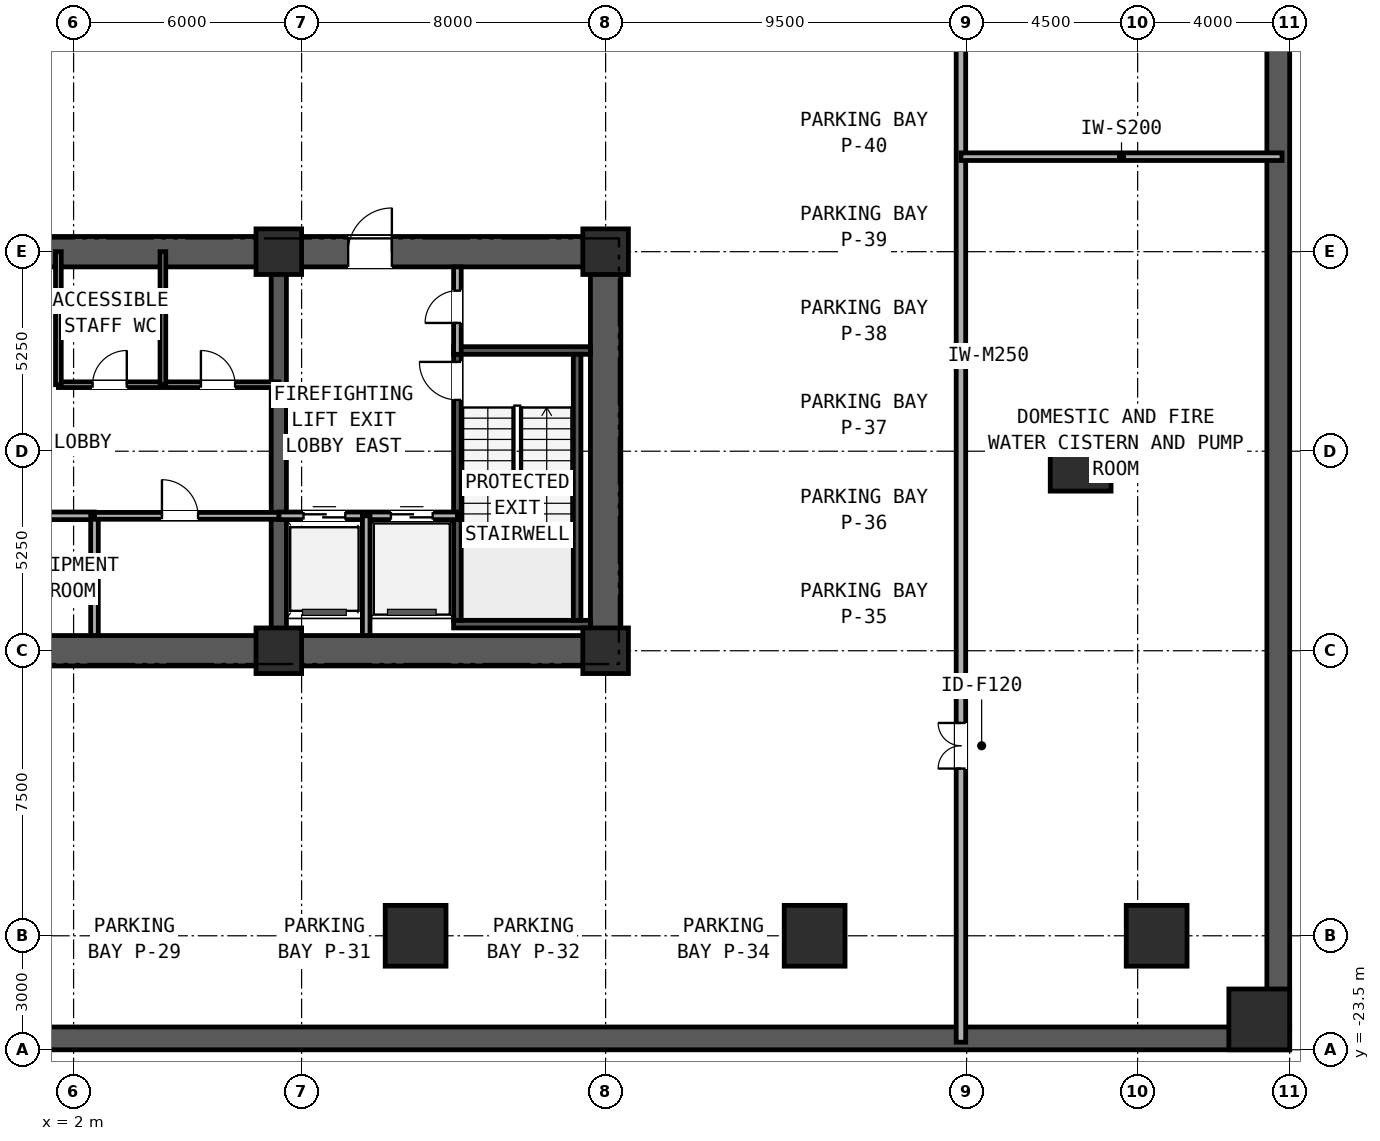
"""IFC4 building model, lengths in metres.
Left out: names, types, materials, properties, quantities, classifications, styles, units other than length and angle.
Written with IfcOpenShell. Run it as: python <this file> out.ifc"""

import sys

from ifc_helpers import new_model, si_unit, direction, frame, frame_2d, origin, origin_2d, place, context, subcontext, project, spatial, rectangle, extrude, element, fill, save


model = new_model("IFC4")
c1 = context("Model", 3, precision=1e-05, world=origin(), true_north=direction((0.0, 1.0)))
c2 = subcontext(c1, "Body", "Model", "MODEL_VIEW")
j1 = project(units=[si_unit("LENGTHUNIT", "METRE"), si_unit("PLANEANGLEUNIT", "RADIAN")], contexts=[c1])
p1 = place(None, origin())
s1 = spatial("IfcSite", under=j1, at=p1, CompositionType="ELEMENT")
p2 = place(p1, origin())
s2 = spatial("IfcBuilding", under=s1, at=p2, CompositionType="ELEMENT")
p3 = place(p2, frame((0.0, 0.0, -10.0)))
s3 = spatial("IfcBuildingStorey", under=s2, at=p3, CompositionType="ELEMENT", Elevation=-10.0)
p4 = place(p3, frame((-16.4, -13.0, 0.0), z_axis=(0.0, 0.0, 1.0), x_axis=(1.0, 0.0, 0.0)))
e1 = element("IfcWall", 1, at=p4, inside=s3, PredefinedType="SHEAR", context=c2, shape_type="SweptSolid", body=[
    extrude(rectangle(XDim=32.8, YDim=0.8, at=frame_2d((16.4, 0.0))), origin(), (0.0, 0.0, 1.0), 4.2),
])
p5 = place(p3, frame((-16.4, -2.5, 0.0), z_axis=(0.0, 0.0, 1.0), x_axis=(1.0, 0.0, 0.0)))
e2 = element("IfcWall", 2, at=p5, inside=s3, PredefinedType="SHEAR", context=c2, shape_type="SweptSolid", body=[
    extrude(rectangle(XDim=32.8, YDim=0.8, at=frame_2d((16.4, 0.0))), origin(), (0.0, 0.0, 1.0), 4.2),
])
p6 = place(p5, frame((6.025, 0.0, 0.0)))
e3 = element("IfcOpeningElement", 3, at=p6, cuts=e2, PredefinedType="OPENING", context=c2, shape_type="SweptSolid", body=[
    extrude(rectangle(XDim=1.15, YDim=2.0, at=frame_2d((0.575, 1.0))), frame((0.0, 0.41, 0.0), z_axis=(0.0, -1.0, 0.0), x_axis=(1.0, 0.0, 0.0)), (0.0, 0.0, 1.0), 0.82),
])
p7 = place(p5, frame((15.6, 0.0, 0.0)))
e4 = element("IfcOpeningElement", 4, at=p7, cuts=e2, PredefinedType="OPENING", context=c2, shape_type="SweptSolid", body=[
    extrude(rectangle(XDim=1.6, YDim=2.0, at=frame_2d((0.8, 1.0))), frame((0.0, 0.41, 0.0), z_axis=(0.0, -1.0, 0.0), x_axis=(1.0, 0.0, 0.0)), (0.0, 0.0, 1.0), 0.82),
])
p8 = place(p5, frame((25.625, 0.0, 0.0)))
e5 = element("IfcOpeningElement", 5, at=p8, cuts=e2, PredefinedType="OPENING", context=c2, shape_type="SweptSolid", body=[
    extrude(rectangle(XDim=1.15, YDim=2.0, at=frame_2d((0.575, 1.0))), frame((0.0, 0.41, 0.0), z_axis=(0.0, -1.0, 0.0), x_axis=(1.0, 0.0, 0.0)), (0.0, 0.0, 1.0), 0.82),
])
p9 = place(p3, frame((16.0, -12.6, 0.0), z_axis=(0.0, 0.0, 1.0), x_axis=(0.0, 1.0, 0.0)))
e6 = element("IfcWall", 6, at=p9, inside=s3, PredefinedType="SHEAR", context=c2, shape_type="SweptSolid", body=[
    extrude(rectangle(XDim=9.7, YDim=0.8, at=frame_2d((4.85, 0.0))), origin(), (0.0, 0.0, 1.0), 4.2),
])
p10 = place(p3, frame((7.4, -12.6, 0.0), z_axis=(0.0, 0.0, 1.0), x_axis=(0.0, 1.0, 0.0)))
e7 = element("IfcWall", 7, at=p10, inside=s3, PredefinedType="SHEAR", context=c2, shape_type="SweptSolid", body=[
    extrude(rectangle(XDim=9.7, YDim=0.4, at=frame_2d((4.85, 0.0))), origin(), (0.0, 0.0, 1.0), 4.48),
])
for number, where, z_axis, x_axis in (
    (8, (12.0, -12.3, 0.0), (0.0, 0.0, 1.0), (1.0, 0.0, 0.0)),
    (9, (12.0, -5.1, 0.0), (0.0, 0.0, 1.0), (1.0, 0.0, 0.0)),
):
    element("IfcWall", number, at=place(p3, frame(where, z_axis=z_axis, x_axis=x_axis)), inside=s3, PredefinedType="SOLIDWALL", context=c2, shape_type="SweptSolid", body=[
        extrude(rectangle(XDim=3.6, YDim=0.2, at=frame_2d((1.8, 0.0))), origin(), (0.0, 0.0, 1.0), 4.48),
    ])
p11 = place(p3, frame((12.1, -12.2, 0.0), z_axis=(0.0, 0.0, 1.0), x_axis=(0.0, 1.0, 0.0)))
e10 = element("IfcWall", 10, at=p11, inside=s3, PredefinedType="SOLIDWALL", context=c2, shape_type="SweptSolid", body=[
    extrude(rectangle(XDim=7.0, YDim=0.2, at=frame_2d((3.5, 0.0))), origin(), (0.0, 0.0, 1.0), 4.48),
])
p12 = place(p11, frame((5.8, 0.0, 0.0)))
e11 = element("IfcOpeningElement", 11, at=p12, cuts=e10, PredefinedType="OPENING", context=c2, shape_type="SweptSolid", body=[
    extrude(rectangle(XDim=1.0, YDim=2.1, at=frame_2d((0.5, 1.05))), frame((0.0, 0.11, 0.0), z_axis=(0.0, -1.0, 0.0), x_axis=(1.0, 0.0, 0.0)), (0.0, 0.0, 1.0), 0.22),
])
p13 = place(p3, frame((15.25, -12.2, 0.0), z_axis=(0.0, 0.0, 1.0), x_axis=(0.0, 1.0, 0.0)))
e12 = element("IfcWall", 12, at=p13, inside=s3, PredefinedType="SOLIDWALL", context=c2, shape_type="SweptSolid", body=[
    extrude(rectangle(XDim=7.0, YDim=0.2, at=frame_2d((3.5, 0.0))), origin(), (0.0, 0.0, 1.0), 4.48),
])
p14 = place(p3, frame((-34.0, -23.2, 0.0), z_axis=(0.0, 0.0, 1.0), x_axis=(1.0, 0.0, 0.0)))
e13 = element("IfcWall", 13, at=p14, inside=s3, PredefinedType="SOLIDWALL", context=c2, shape_type="SweptSolid", body=[
    extrude(rectangle(XDim=68.0, YDim=0.6, at=frame_2d((34.0, 0.0))), origin(), (0.0, 0.0, 1.0), 4.48),
])
p15 = place(p3, frame((33.7, -22.9, 0.0), z_axis=(0.0, 0.0, 1.0), x_axis=(0.0, 1.0, 0.0)))
e14 = element("IfcWall", 14, at=p15, inside=s3, PredefinedType="SOLIDWALL", context=c2, shape_type="SweptSolid", body=[
    extrude(rectangle(XDim=45.8, YDim=0.6, at=frame_2d((22.9, 0.0))), origin(), (0.0, 0.0, 1.0), 4.48),
])
for number, where, z_axis, x_axis in (
    (15, (7.4, -13.0, 0.0), (0.0, 0.0, 1.0), (1.0, 0.0, 0.0)),
    (16, (16.0, -13.0, 0.0), (0.0, 0.0, 1.0), (1.0, 0.0, 0.0)),
    (17, (7.4, -2.5, 0.0), (0.0, 0.0, 1.0), (1.0, 0.0, 0.0)),
    (18, (16.0, -2.5, 0.0), (0.0, 0.0, 1.0), (1.0, 0.0, 0.0)),
):
    element("IfcColumn", number, at=place(p3, frame(where, z_axis=z_axis, x_axis=x_axis)), inside=s3, PredefinedType="COLUMN", context=c2, shape_type="SweptSolid", body=[
        extrude(rectangle(XDim=1.2, YDim=1.2, at=origin_2d()), origin(), (0.0, 0.0, 1.0), 4.8),
    ])
for number, where, z_axis, x_axis in (
    (19, (33.2, -22.7, 0.0), (0.0, 0.0, 1.0), (1.0, 0.0, 0.0)),
    (20, (11.0, -20.5, 0.0), (0.0, 0.0, 1.0), (1.0, 0.0, 0.0)),
    (21, (21.5, -20.5, 0.0), (0.0, 0.0, 1.0), (1.0, 0.0, 0.0)),
    (22, (30.5, -20.5, 0.0), (0.0, 0.0, 1.0), (1.0, 0.0, 0.0)),
    (23, (28.5, -8.0, 0.0), (0.0, 0.0, 1.0), (1.0, 0.0, 0.0)),
):
    element("IfcColumn", number, at=place(p3, frame(where, z_axis=z_axis, x_axis=x_axis)), inside=s3, PredefinedType="COLUMN", context=c2, shape_type="SweptSolid", body=[
        extrude(rectangle(XDim=1.6, YDim=1.6, at=origin_2d()), origin(), (0.0, 0.0, 1.0), 4.8),
    ])
p16 = place(p3, frame((12.1, -5.2, 0.0), z_axis=(0.0, 0.0, 1.0), x_axis=(0.0, 1.0, 0.0)))
e24 = element("IfcWall", 24, at=p16, inside=s3, PredefinedType="PARTITIONING", context=c2, shape_type="SweptSolid", body=[
    extrude(rectangle(XDim=2.3, YDim=0.2, at=frame_2d((1.15, 0.0))), origin(), (0.0, 0.0, 1.0), 4.48),
])
p17 = place(p16, frame((0.825, 0.0, 0.0)))
e25 = element("IfcOpeningElement", 25, at=p17, cuts=e24, PredefinedType="OPENING", context=c2, shape_type="SweptSolid", body=[
    extrude(rectangle(XDim=0.85, YDim=2.05, at=frame_2d((0.425, 1.025))), frame((0.0, 0.11, 0.0), z_axis=(0.0, -1.0, 0.0), x_axis=(1.0, 0.0, 0.0)), (0.0, 0.0, 1.0), 0.22),
])
p18 = place(p3, frame((7.4, -9.45, 0.0), z_axis=(0.0, 0.0, 1.0), x_axis=(1.0, 0.0, 0.0)))
e26 = element("IfcWall", 26, at=p18, inside=s3, PredefinedType="PARTITIONING", context=c2, shape_type="SweptSolid", body=[
    extrude(rectangle(XDim=4.7, YDim=0.2, at=frame_2d((2.35, 0.0))), origin(), (0.0, 0.0, 1.0), 4.48),
])
p19 = place(p18, frame((2.95, 0.0, 0.0)))
e27 = element("IfcOpeningElement", 27, at=p19, cuts=e26, PredefinedType="OPENING", context=c2, shape_type="SweptSolid", body=[
    extrude(rectangle(XDim=1.1, YDim=2.2, at=frame_2d((0.55, 1.1))), frame((0.0, 0.11, 0.0), z_axis=(0.0, -1.0, 0.0), x_axis=(1.0, 0.0, 0.0)), (0.0, 0.0, 1.0), 0.22),
])
p20 = place(p18, frame((0.65, 0.0, 0.0)))
e28 = element("IfcOpeningElement", 28, at=p20, cuts=e26, PredefinedType="OPENING", context=c2, shape_type="SweptSolid", body=[
    extrude(rectangle(XDim=1.1, YDim=2.2, at=frame_2d((0.55, 1.1))), frame((0.0, 0.11, 0.0), z_axis=(0.0, -1.0, 0.0), x_axis=(1.0, 0.0, 0.0)), (0.0, 0.0, 1.0), 0.22),
])
p21 = place(p3, frame((9.7, -12.6, 0.0), z_axis=(0.0, 0.0, 1.0), x_axis=(0.0, 1.0, 0.0)))
e29 = element("IfcWall", 29, at=p21, inside=s3, PredefinedType="PARTITIONING", context=c2, shape_type="SweptSolid", body=[
    extrude(rectangle(XDim=3.15, YDim=0.2, at=frame_2d((1.575, 0.0))), origin(), (0.0, 0.0, 1.0), 4.48),
])
p22 = place(p3, frame((-2.55, -9.45, 0.0), z_axis=(0.0, 0.0, 1.0), x_axis=(1.0, 0.0, 0.0)))
e30 = element("IfcWall", 30, at=p22, inside=s3, PredefinedType="PARTITIONING", context=c2, shape_type="SweptSolid", body=[
    extrude(rectangle(XDim=5.1, YDim=0.2, at=frame_2d((2.55, 0.0))), origin(), (0.0, 0.0, 1.0), 4.48),
])
p23 = place(p22, frame((2.075, 0.0, 0.0)))
e31 = element("IfcOpeningElement", 31, at=p23, cuts=e30, PredefinedType="OPENING", context=c2, shape_type="SweptSolid", body=[
    extrude(rectangle(XDim=0.95, YDim=2.15, at=frame_2d((0.475, 1.075))), frame((0.0, 0.11, 0.0), z_axis=(0.0, -1.0, 0.0), x_axis=(1.0, 0.0, 0.0)), (0.0, 0.0, 1.0), 0.22),
])
p24 = place(p3, frame((2.55, -12.6, 0.0), z_axis=(0.0, 0.0, 1.0), x_axis=(0.0, 1.0, 0.0)))
e32 = element("IfcWall", 32, at=p24, inside=s3, PredefinedType="PARTITIONING", context=c2, shape_type="SweptSolid", body=[
    extrude(rectangle(XDim=3.15, YDim=0.2, at=frame_2d((1.575, 0.0))), origin(), (0.0, 0.0, 1.0), 4.48),
])
p25 = place(p3, frame((2.55, -9.45, 0.0), z_axis=(0.0, 0.0, 1.0), x_axis=(1.0, 0.0, 0.0)))
e33 = element("IfcWall", 33, at=p25, inside=s3, PredefinedType="PARTITIONING", context=c2, shape_type="SweptSolid", body=[
    extrude(rectangle(XDim=4.85, YDim=0.18, at=frame_2d((2.425, 0.0))), origin(), (0.0, 0.0, 1.0), 4.48),
])
p26 = place(p25, frame((1.775, 0.0, 0.0)))
e34 = element("IfcOpeningElement", 34, at=p26, cuts=e33, PredefinedType="OPENING", context=c2, shape_type="SweptSolid", body=[
    extrude(rectangle(XDim=0.95, YDim=2.15, at=frame_2d((0.475, 1.075))), frame((0.0, 0.1, 0.0), z_axis=(0.0, -1.0, 0.0), x_axis=(1.0, 0.0, 0.0)), (0.0, 0.0, 1.0), 0.2),
])
p27 = place(p3, frame((1.6, -6.0, 0.0), z_axis=(0.0, 0.0, 1.0), x_axis=(1.0, 0.0, 0.0)))
e35 = element("IfcWall", 35, at=p27, inside=s3, PredefinedType="PARTITIONING", context=c2, shape_type="SweptSolid", body=[
    extrude(rectangle(XDim=5.8, YDim=0.15, at=frame_2d((2.9, 0.0))), origin(), (0.0, 0.0, 1.0), 4.48),
])
p28 = place(p27, frame((0.9, 0.0, 0.0)))
e36 = element("IfcOpeningElement", 36, at=p28, cuts=e35, PredefinedType="OPENING", context=c2, shape_type="SweptSolid", body=[
    extrude(rectangle(XDim=0.9, YDim=2.1, at=frame_2d((0.45, 1.05))), frame((0.0, 0.085, 0.0), z_axis=(0.0, -1.0, 0.0), x_axis=(1.0, 0.0, 0.0)), (0.0, 0.0, 1.0), 0.17),
])
p29 = place(p27, frame((3.75, 0.0, 0.0)))
e37 = element("IfcOpeningElement", 37, at=p29, cuts=e35, PredefinedType="OPENING", context=c2, shape_type="SweptSolid", body=[
    extrude(rectangle(XDim=0.9, YDim=2.1, at=frame_2d((0.45, 1.05))), frame((0.0, 0.085, 0.0), z_axis=(0.0, -1.0, 0.0), x_axis=(1.0, 0.0, 0.0)), (0.0, 0.0, 1.0), 0.17),
])
for number, where, z_axis, x_axis in (
    (38, (1.6, -6.0, 0.0), (0.0, 0.0, 1.0), (0.0, 1.0, 0.0)),
    (39, (4.35, -6.0, 0.0), (0.0, 0.0, 1.0), (0.0, 1.0, 0.0)),
):
    element("IfcWall", number, at=place(p3, frame(where, z_axis=z_axis, x_axis=x_axis)), inside=s3, PredefinedType="PARTITIONING", context=c2, shape_type="SweptSolid", body=[
        extrude(rectangle(XDim=3.5, YDim=0.15, at=frame_2d((1.75, 0.0))), origin(), (0.0, 0.0, 1.0), 3.61),
    ])
p30 = place(p3, frame((25.35, -23.3, 0.0), z_axis=(0.0, 0.0, 1.0), x_axis=(0.0, 1.0, 0.0)))
e40 = element("IfcWall", 40, at=p30, inside=s3, PredefinedType="PARTITIONING", context=c2, shape_type="SweptSolid", body=[
    extrude(rectangle(XDim=46.6, YDim=0.25, at=frame_2d((23.3, 0.0))), origin(), (0.0, 0.0, 1.0), 3.522),
])
p31 = place(p30, frame((7.2, 0.0, 0.0)))
e41 = element("IfcOpeningElement", 41, at=p31, cuts=e40, PredefinedType="OPENING", context=c2, shape_type="SweptSolid", body=[
    extrude(rectangle(XDim=1.2, YDim=2.2, at=frame_2d((0.6, 1.1))), frame((0.0, 0.135, 0.0), z_axis=(0.0, -1.0, 0.0), x_axis=(1.0, 0.0, 0.0)), (0.0, 0.0, 1.0), 0.27),
])
p32 = place(p30, frame((27.7, 0.0, 0.0)))
e42 = element("IfcOpeningElement", 42, at=p32, cuts=e40, PredefinedType="OPENING", context=c2, shape_type="SweptSolid", body=[
    extrude(rectangle(XDim=1.2, YDim=2.2, at=frame_2d((0.6, 1.1))), frame((0.0, 0.135, 0.0), z_axis=(0.0, -1.0, 0.0), x_axis=(1.0, 0.0, 0.0)), (0.0, 0.0, 1.0), 0.27),
])
p33 = place(p3, frame((25.35, 0.0, 0.0), z_axis=(0.0, 0.0, 1.0), x_axis=(1.0, 0.0, 0.0)))
e43 = element("IfcWall", 43, at=p33, inside=s3, PredefinedType="PARTITIONING", context=c2, shape_type="SweptSolid", body=[
    extrude(rectangle(XDim=8.45, YDim=0.2, at=frame_2d((4.225, 0.0))), origin(), (0.0, 0.0, 1.0), 3.61),
])
p34 = place(p12, origin())
e44 = element("IfcDoor", 44, at=p34, inside=s3, OperationType="SINGLE_SWING_RIGHT", PredefinedType="DOOR", context=c2, shape_type="SweptSolid", body=[
    extrude(rectangle(XDim=1.0, YDim=2.1, at=frame_2d((0.5, 1.05))), frame((0.0, 0.025, 0.0), z_axis=(0.0, -1.0, 0.0), x_axis=(1.0, 0.0, 0.0)), (0.0, 0.0, 1.0), 0.05),
])
fill(e11, e44)
p35 = place(p17, frame((0.85, 0.0, 0.0), z_axis=(0.0, 0.0, 1.0), x_axis=(-1.0, 0.0, 0.0)))
e45 = element("IfcDoor", 45, at=p35, inside=s3, OperationType="SINGLE_SWING_LEFT", PredefinedType="DOOR", context=c2, shape_type="SweptSolid", body=[
    extrude(rectangle(XDim=0.85, YDim=2.05, at=frame_2d((0.425, 1.025))), frame((0.0, 0.025, 0.0), z_axis=(0.0, -1.0, 0.0), x_axis=(1.0, 0.0, 0.0)), (0.0, 0.0, 1.0), 0.05),
])
fill(e25, e45)
p36 = place(p19, origin())
e46 = element("IfcDoor", 46, at=p36, inside=s3, OperationType="SLIDING_TO_LEFT", PredefinedType="DOOR", context=c2, shape_type="SweptSolid", body=[
    extrude(rectangle(XDim=1.1, YDim=2.2, at=frame_2d((0.55, 1.1))), frame((0.0, 0.025, 0.0), z_axis=(0.0, -1.0, 0.0), x_axis=(1.0, 0.0, 0.0)), (0.0, 0.0, 1.0), 0.05),
])
fill(e27, e46)
p37 = place(p20, origin())
e47 = element("IfcDoor", 47, at=p37, inside=s3, OperationType="SLIDING_TO_RIGHT", PredefinedType="DOOR", context=c2, shape_type="SweptSolid", body=[
    extrude(rectangle(XDim=1.1, YDim=2.2, at=frame_2d((0.55, 1.1))), frame((0.0, 0.025, 0.0), z_axis=(0.0, -1.0, 0.0), x_axis=(1.0, 0.0, 0.0)), (0.0, 0.0, 1.0), 0.05),
])
fill(e28, e47)
p38 = place(p8, origin())
e48 = element("IfcDoor", 48, at=p38, inside=s3, OperationType="SINGLE_SWING_RIGHT", PredefinedType="DOOR", context=c2, shape_type="SweptSolid", body=[
    extrude(rectangle(XDim=1.15, YDim=2.0, at=frame_2d((0.575, 1.0))), frame((0.0, 0.025, 0.0), z_axis=(0.0, -1.0, 0.0), x_axis=(1.0, 0.0, 0.0)), (0.0, 0.0, 1.0), 0.05),
])
fill(e5, e48)
p39 = place(p26, origin())
e49 = element("IfcDoor", 49, at=p39, inside=s3, OperationType="SINGLE_SWING_LEFT", PredefinedType="DOOR", context=c2, shape_type="SweptSolid", body=[
    extrude(rectangle(XDim=0.95, YDim=2.15, at=frame_2d((0.475, 1.075))), frame((0.0, 0.025, 0.0), z_axis=(0.0, -1.0, 0.0), x_axis=(1.0, 0.0, 0.0)), (0.0, 0.0, 1.0), 0.05),
])
fill(e34, e49)
p40 = place(p28, frame((0.9, 0.0, 0.0), z_axis=(0.0, 0.0, 1.0), x_axis=(-1.0, 0.0, 0.0)))
e50 = element("IfcDoor", 50, at=p40, inside=s3, OperationType="SINGLE_SWING_RIGHT", PredefinedType="DOOR", context=c2, shape_type="SweptSolid", body=[
    extrude(rectangle(XDim=0.9, YDim=2.1, at=frame_2d((0.45, 1.05))), frame((0.0, 0.025, 0.0), z_axis=(0.0, -1.0, 0.0), x_axis=(1.0, 0.0, 0.0)), (0.0, 0.0, 1.0), 0.05),
])
fill(e36, e50)
p41 = place(p29, frame((0.9, 0.0, 0.0), z_axis=(0.0, 0.0, 1.0), x_axis=(-1.0, 0.0, 0.0)))
e51 = element("IfcDoor", 51, at=p41, inside=s3, OperationType="SINGLE_SWING_LEFT", PredefinedType="DOOR", context=c2, shape_type="SweptSolid", body=[
    extrude(rectangle(XDim=0.9, YDim=2.1, at=frame_2d((0.45, 1.05))), frame((0.0, 0.025, 0.0), z_axis=(0.0, -1.0, 0.0), x_axis=(1.0, 0.0, 0.0)), (0.0, 0.0, 1.0), 0.05),
])
fill(e37, e51)
p42 = place(p31, origin())
e52 = element("IfcDoor", 52, at=p42, inside=s3, OperationType="DOUBLE_DOOR_SINGLE_SWING", PredefinedType="DOOR", context=c2, shape_type="SweptSolid", body=[
    extrude(rectangle(XDim=1.2, YDim=2.2, at=frame_2d((0.6, 1.1))), frame((0.0, 0.025, 0.0), z_axis=(0.0, -1.0, 0.0), x_axis=(1.0, 0.0, 0.0)), (0.0, 0.0, 1.0), 0.05),
])
fill(e41, e52)
save(model, sys.argv[1])
